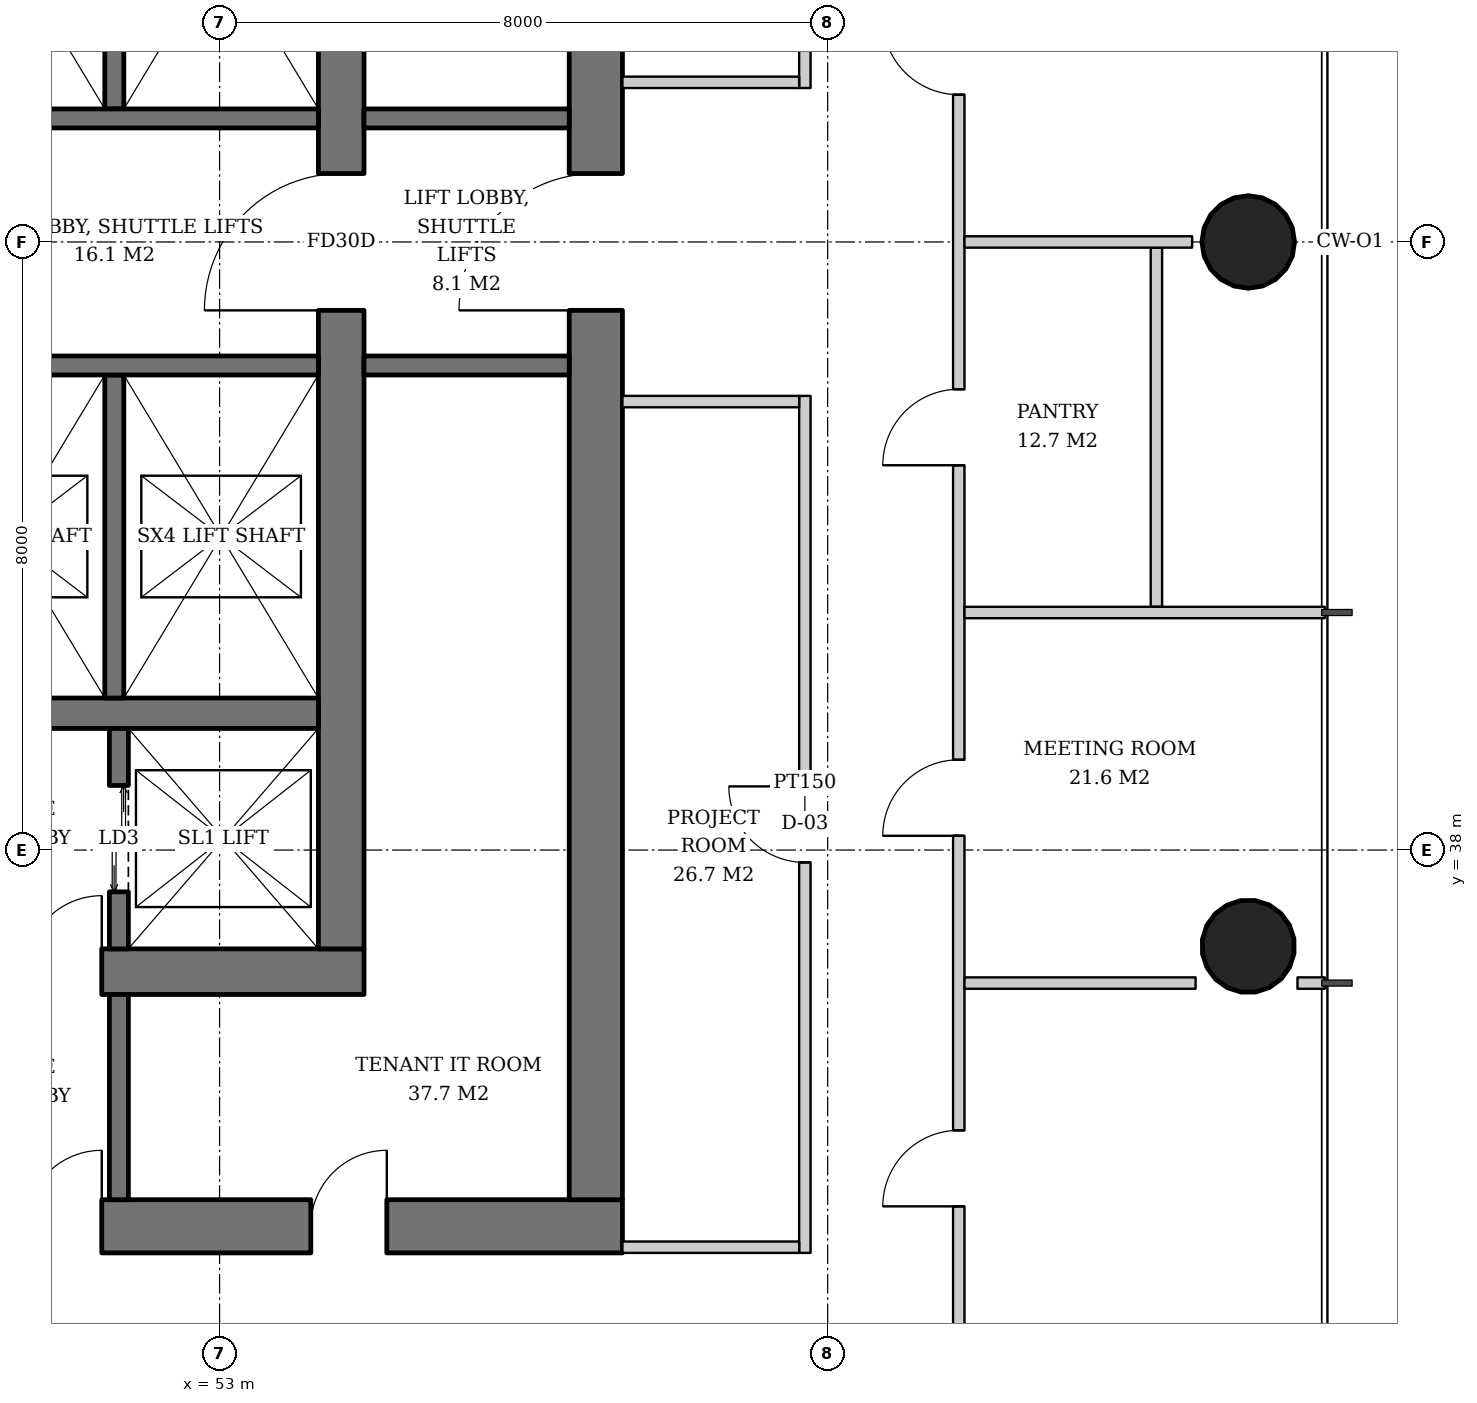
"""IFC4 building model, lengths in metres.
Left out: names, types, materials, properties, quantities, classifications, styles, units other than length and angle.
Written with IfcOpenShell. Run it as: python <this file> out.ifc"""

import sys

from ifc_helpers import new_model, si_unit, direction, frame, frame_2d, origin, origin_2d, place, context, subcontext, project, spatial, rectangle, hollow_circle, extrude, element, fill, save


model = new_model("IFC4")
c1 = context("Model", 3, precision=1e-05, world=origin(), true_north=direction((0.0, 1.0)))
c2 = subcontext(c1, "Body", "Model", "MODEL_VIEW")
j1 = project(units=[si_unit("LENGTHUNIT", "METRE"), si_unit("PLANEANGLEUNIT", "RADIAN")], contexts=[c1])
p1 = place(None, origin())
s1 = spatial("IfcSite", under=j1, at=p1, CompositionType="ELEMENT")
p2 = place(p1, origin())
s2 = spatial("IfcBuilding", under=s1, at=p2, CompositionType="ELEMENT")
p3 = place(p2, frame((0.0, 0.0, 97.0)))
s3 = spatial("IfcBuildingStorey", under=s2, at=p3, CompositionType="ELEMENT", Elevation=97.0)
p4 = place(p3, frame((66.572, 36.714, 0.0), z_axis=(-0.031974442509, 0.015923015547, 0.999361842679), x_axis=(-0.445775033553, -0.895145027055, 0.0)))
e1 = element("IfcColumn", 1, at=p4, inside=s3, PredefinedType="COLUMN", context=c2, shape_type="SweptSolid", body=[
    extrude(hollow_circle(Radius=0.61, WallThickness=0.04, at=origin_2d()), origin(), (0.0, 0.0, 1.0), 3.802),
])
p5 = place(p3, frame((66.572, 46.0, 0.0), z_axis=(-0.031978496719, 0.0, 0.999488557087), x_axis=(0.0, -1.0, 0.0)))
e2 = element("IfcColumn", 2, at=p5, inside=s3, PredefinedType="COLUMN", context=c2, shape_type="SweptSolid", body=[
    extrude(hollow_circle(Radius=0.61, WallThickness=0.04, at=origin_2d()), origin(), (0.0, 0.0, 1.0), 3.802),
])
p6 = place(p3, frame((35.1, 36.4, 0.0), z_axis=(0.0, 0.0, 1.0), x_axis=(1.0, 0.0, 0.0)))
e3 = element("IfcWall", 3, at=p6, inside=s3, PredefinedType="SHEAR", context=c2, shape_type="SweptSolid", body=[
    extrude(rectangle(XDim=19.8, YDim=0.6, at=frame_2d((9.9, 0.0))), origin(), (0.0, 0.0, 1.0), 3.8),
])
p7 = place(p6, frame((3.9, 0.0, 0.0)))
e4 = element("IfcOpeningElement", 4, at=p7, cuts=e3, PredefinedType="OPENING", context=c2, shape_type="SweptSolid", body=[
    extrude(rectangle(XDim=1.0, YDim=2.1, at=frame_2d((0.5, 1.05))), frame((0.0, 0.31, 0.0), z_axis=(0.0, -1.0, 0.0), x_axis=(1.0, 0.0, 0.0)), (0.0, 0.0, 1.0), 0.62),
])
p8 = place(p6, frame((15.35, 0.0, 0.0)))
e5 = element("IfcOpeningElement", 5, at=p8, cuts=e3, PredefinedType="OPENING", context=c2, shape_type="SweptSolid", body=[
    extrude(rectangle(XDim=1.0, YDim=2.1, at=frame_2d((0.5, 1.05))), frame((0.0, 0.31, 0.0), z_axis=(0.0, -1.0, 0.0), x_axis=(1.0, 0.0, 0.0)), (0.0, 0.0, 1.0), 0.62),
])
p9 = place(p3, frame((54.6, 36.7, 0.0), z_axis=(0.0, 0.0, 1.0), x_axis=(0.0, 1.0, 0.0)))
e6 = element("IfcWall", 6, at=p9, inside=s3, PredefinedType="SHEAR", context=c2, shape_type="SweptSolid", body=[
    extrude(rectangle(XDim=18.6, YDim=0.6, at=frame_2d((9.3, 0.0))), origin(), (0.0, 0.0, 1.0), 3.8),
])
p10 = place(p9, frame((8.4, 0.0, 0.0)))
e7 = element("IfcOpeningElement", 7, at=p10, cuts=e6, PredefinedType="OPENING", context=c2, shape_type="SweptSolid", body=[
    extrude(rectangle(XDim=1.8, YDim=2.4, at=frame_2d((0.9, 1.2))), frame((0.0, 0.31, 0.0), z_axis=(0.0, -1.0, 0.0), x_axis=(1.0, 0.0, 0.0)), (0.0, 0.0, 1.0), 0.62),
])
p11 = place(p3, frame((31.7, 33.05, 0.0), z_axis=(0.0, 0.0, 1.0), x_axis=(1.0, 0.0, 0.0)))
e8 = element("IfcWall", 8, at=p11, inside=s3, PredefinedType="SHEAR", context=c2, shape_type="SweptSolid", body=[
    extrude(rectangle(XDim=26.6, YDim=0.7, at=frame_2d((13.3, 0.0))), origin(), (0.0, 0.0, 1.0), 3.8),
])
p12 = place(p11, frame((7.3, 0.0, 0.0)))
e9 = element("IfcOpeningElement", 9, at=p12, cuts=e8, PredefinedType="OPENING", context=c2, shape_type="SweptSolid", body=[
    extrude(rectangle(XDim=1.0, YDim=2.1, at=frame_2d((0.5, 1.05))), frame((0.0, 0.36, 0.0), z_axis=(0.0, -1.0, 0.0), x_axis=(1.0, 0.0, 0.0)), (0.0, 0.0, 1.0), 0.72),
])
p13 = place(p11, frame((18.75, 0.0, 0.0)))
e10 = element("IfcOpeningElement", 10, at=p13, cuts=e8, PredefinedType="OPENING", context=c2, shape_type="SweptSolid", body=[
    extrude(rectangle(XDim=1.0, YDim=2.1, at=frame_2d((0.5, 1.05))), frame((0.0, 0.36, 0.0), z_axis=(0.0, -1.0, 0.0), x_axis=(1.0, 0.0, 0.0)), (0.0, 0.0, 1.0), 0.72),
])
p14 = place(p11, frame((3.2, 0.0, 0.0)))
e11 = element("IfcOpeningElement", 11, at=p14, cuts=e8, PredefinedType="OPENING", context=c2, shape_type="SweptSolid", body=[
    extrude(rectangle(XDim=1.0, YDim=2.1, at=frame_2d((0.5, 1.05))), frame((0.0, 0.36, 0.0), z_axis=(0.0, -1.0, 0.0), x_axis=(1.0, 0.0, 0.0)), (0.0, 0.0, 1.0), 0.72),
])
p15 = place(p11, frame((10.42, 0.0, 0.0)))
e12 = element("IfcOpeningElement", 12, at=p15, cuts=e8, PredefinedType="OPENING", context=c2, shape_type="SweptSolid", body=[
    extrude(rectangle(XDim=1.0, YDim=2.1, at=frame_2d((0.5, 1.05))), frame((0.0, 0.36, 0.0), z_axis=(0.0, -1.0, 0.0), x_axis=(1.0, 0.0, 0.0)), (0.0, 0.0, 1.0), 0.72),
])
p16 = place(p11, frame((14.46, 0.0, 0.0)))
e13 = element("IfcOpeningElement", 13, at=p16, cuts=e8, PredefinedType="OPENING", context=c2, shape_type="SweptSolid", body=[
    extrude(rectangle(XDim=1.0, YDim=2.1, at=frame_2d((0.5, 1.05))), frame((0.0, 0.36, 0.0), z_axis=(0.0, -1.0, 0.0), x_axis=(1.0, 0.0, 0.0)), (0.0, 0.0, 1.0), 0.72),
])
p17 = place(p11, frame((22.5, 0.0, 0.0)))
e14 = element("IfcOpeningElement", 14, at=p17, cuts=e8, PredefinedType="OPENING", context=c2, shape_type="SweptSolid", body=[
    extrude(rectangle(XDim=1.0, YDim=2.1, at=frame_2d((0.5, 1.05))), frame((0.0, 0.36, 0.0), z_axis=(0.0, -1.0, 0.0), x_axis=(1.0, 0.0, 0.0)), (0.0, 0.0, 1.0), 0.72),
])
p18 = place(p3, frame((57.95, 33.4, 0.0), z_axis=(0.0, 0.0, 1.0), x_axis=(0.0, 1.0, 0.0)))
e15 = element("IfcWall", 15, at=p18, inside=s3, PredefinedType="SHEAR", context=c2, shape_type="SweptSolid", body=[
    extrude(rectangle(XDim=25.2, YDim=0.7, at=frame_2d((12.6, 0.0))), origin(), (0.0, 0.0, 1.0), 3.8),
])
p19 = place(p18, frame((11.7, 0.0, 0.0)))
e16 = element("IfcOpeningElement", 16, at=p19, cuts=e15, PredefinedType="OPENING", context=c2, shape_type="SweptSolid", body=[
    extrude(rectangle(XDim=1.8, YDim=2.4, at=frame_2d((0.9, 1.2))), frame((0.0, 0.36, 0.0), z_axis=(0.0, -1.0, 0.0), x_axis=(1.0, 0.0, 0.0)), (0.0, 0.0, 1.0), 0.72),
])
p20 = place(p3, frame((35.7, 39.8, 0.0), z_axis=(0.0, 0.0, 1.0), x_axis=(1.0, 0.0, 0.0)))
e17 = element("IfcWall", 17, at=p20, inside=s3, PredefinedType="SHEAR", context=c2, shape_type="SweptSolid", body=[
    extrude(rectangle(XDim=18.6, YDim=0.4, at=frame_2d((9.3, 0.0))), origin(), (0.0, 0.0, 1.0), 3.8),
])
p21 = place(p3, frame((51.675, 36.7, 0.0), z_axis=(0.0, 0.0, 1.0), x_axis=(0.0, 1.0, 0.0)))
e18 = element("IfcWall", 18, at=p21, inside=s3, PredefinedType="SHEAR", context=c2, shape_type="SweptSolid", body=[
    extrude(rectangle(XDim=2.9, YDim=0.25, at=frame_2d((1.45, 0.0))), origin(), (0.0, 0.0, 1.0), 3.8),
])
p22 = place(p21, frame((0.75, 0.0, 0.0)))
e19 = element("IfcOpeningElement", 19, at=p22, cuts=e18, PredefinedType="OPENING", context=c2, shape_type="SweptSolid", body=[
    extrude(rectangle(XDim=1.4, YDim=2.4, at=frame_2d((0.7, 1.2))), frame((0.0, 0.135, 0.0), z_axis=(0.0, -1.0, 0.0), x_axis=(1.0, 0.0, 0.0)), (0.0, 0.0, 1.0), 0.27),
])
p23 = place(p3, frame((51.615, 47.75, 0.0), z_axis=(0.0, 0.0, 1.0), x_axis=(0.0, 1.0, 0.0)))
e20 = element("IfcWall", 20, at=p23, inside=s3, PredefinedType="SHEAR", context=c2, shape_type="SweptSolid", body=[
    extrude(rectangle(XDim=4.25, YDim=0.25, at=frame_2d((2.125, 0.0))), origin(), (0.0, 0.0, 1.0), 3.8),
])
p24 = place(p3, frame((48.93, 47.625, 0.0), z_axis=(0.0, 0.0, 1.0), x_axis=(1.0, 0.0, 0.0)))
e21 = element("IfcWall", 21, at=p24, inside=s3, PredefinedType="SHEAR", context=c2, shape_type="SweptSolid", body=[
    extrude(rectangle(XDim=5.37, YDim=0.25, at=frame_2d((2.685, 0.0))), origin(), (0.0, 0.0, 1.0), 3.8),
])
p25 = place(p3, frame((51.615, 44.25, 0.0), z_axis=(0.0, 0.0, 1.0), x_axis=(0.0, -1.0, 0.0)))
e22 = element("IfcWall", 22, at=p25, inside=s3, PredefinedType="SHEAR", context=c2, shape_type="SweptSolid", body=[
    extrude(rectangle(XDim=4.25, YDim=0.25, at=frame_2d((2.125, 0.0))), origin(), (0.0, 0.0, 1.0), 3.8),
])
p26 = place(p3, frame((48.93, 44.375, 0.0), z_axis=(0.0, 0.0, 1.0), x_axis=(1.0, 0.0, 0.0)))
e23 = element("IfcWall", 23, at=p26, inside=s3, PredefinedType="SHEAR", context=c2, shape_type="SweptSolid", body=[
    extrude(rectangle(XDim=5.37, YDim=0.25, at=frame_2d((2.685, 0.0))), origin(), (0.0, 0.0, 1.0), 3.8),
])
for number, where, z_axis, x_axis in (
    (24, (54.9, 44.375, 0.0), (0.0, 0.0, 1.0), (1.0, 0.0, 0.0)),
    (25, (54.9, 47.625, 0.0), (0.0, 0.0, 1.0), (1.0, 0.0, 0.0)),
    (26, (51.675, 33.4, 0.0), (0.0, 0.0, 1.0), (0.0, 1.0, 0.0)),
):
    element("IfcWall", number, at=place(p3, frame(where, z_axis=z_axis, x_axis=x_axis)), inside=s3, PredefinedType="SOLIDWALL", context=c2, shape_type="SweptSolid", body=[
        extrude(rectangle(XDim=2.7, YDim=0.25, at=frame_2d((1.35, 0.0))), origin(), (0.0, 0.0, 1.0), 3.62),
    ])
p27 = place(p3, frame((60.7, 32.7, 0.0), z_axis=(0.0, 0.0, 1.0), x_axis=(0.0, 1.0, 0.0)))
e27 = element("IfcWall", 27, at=p27, inside=s3, PredefinedType="PARTITIONING", context=c2, shape_type="SweptSolid", body=[
    extrude(rectangle(XDim=11.275, YDim=0.15, at=frame_2d((5.638, 0.0))), origin(), (0.0, 0.0, 1.0), 2.72),
])
p28 = place(p27, frame((5.137, 0.0, 0.0)))
e28 = element("IfcOpeningElement", 28, at=p28, cuts=e27, PredefinedType="OPENING", context=c2, shape_type="SweptSolid", body=[
    extrude(rectangle(XDim=1.0, YDim=2.1, at=frame_2d((0.5, 1.05))), frame((0.0, 0.085, 0.0), z_axis=(0.0, -1.0, 0.0), x_axis=(1.0, 0.0, 0.0)), (0.0, 0.0, 1.0), 0.17),
])
for number, where, z_axis, x_axis in (
    (29, (58.3, 32.775, 0.0), (0.0, 0.0, 1.0), (1.0, 0.0, 0.0)),
    (30, (58.3, 43.9, 0.0), (0.0, 0.0, 1.0), (1.0, 0.0, 0.0)),
):
    element("IfcWall", number, at=place(p3, frame(where, z_axis=z_axis, x_axis=x_axis)), inside=s3, PredefinedType="PARTITIONING", context=c2, shape_type="SweptSolid", body=[
        extrude(rectangle(XDim=2.325, YDim=0.15, at=frame_2d((1.163, 0.0))), origin(), (0.0, 0.0, 1.0), 3.62),
    ])
p29 = place(p3, frame((60.7, 48.025, 0.0), z_axis=(0.0, 0.0, 1.0), x_axis=(0.0, 1.0, 0.0)))
e31 = element("IfcWall", 31, at=p29, inside=s3, PredefinedType="PARTITIONING", context=c2, shape_type="SweptSolid", body=[
    extrude(rectangle(XDim=11.275, YDim=0.15, at=frame_2d((5.638, 0.0))), origin(), (0.0, 0.0, 1.0), 2.806),
])
p30 = place(p29, frame((5.137, 0.0, 0.0)))
e32 = element("IfcOpeningElement", 32, at=p30, cuts=e31, PredefinedType="OPENING", context=c2, shape_type="SweptSolid", body=[
    extrude(rectangle(XDim=1.0, YDim=2.1, at=frame_2d((0.5, 1.05))), frame((0.0, 0.085, 0.0), z_axis=(0.0, -1.0, 0.0), x_axis=(1.0, 0.0, 0.0)), (0.0, 0.0, 1.0), 0.17),
])
p31 = place(p3, frame((58.3, 48.1, 0.0), z_axis=(0.0, 0.0, 1.0), x_axis=(1.0, 0.0, 0.0)))
e33 = element("IfcWall", 33, at=p31, inside=s3, PredefinedType="PARTITIONING", context=c2, shape_type="SweptSolid", body=[
    extrude(rectangle(XDim=2.325, YDim=0.15, at=frame_2d((1.163, 0.0))), origin(), (0.0, 0.0, 1.0), 3.62),
])
p32 = place(p3, frame((65.325, 41.2, 0.0), z_axis=(0.0, 0.0, 1.0), x_axis=(0.0, 1.0, 0.0)))
e34 = element("IfcWall", 34, at=p32, inside=s3, PredefinedType="PARTITIONING", context=c2, shape_type="SweptSolid", body=[
    extrude(rectangle(XDim=4.725, YDim=0.15, at=frame_2d((2.363, 0.0))), origin(), (0.0, 0.0, 1.0), 2.858),
])
p33 = place(p3, frame((62.725, 30.188, 0.0), z_axis=(0.0, 0.0, 1.0), x_axis=(0.0, 1.0, 0.0)))
e35 = element("IfcWall", 35, at=p33, inside=s3, PredefinedType="PARTITIONING", context=c2, shape_type="SweptSolid", body=[
    extrude(rectangle(XDim=31.623, YDim=0.15, at=frame_2d((15.812, 0.0))), origin(), (0.0, 0.0, 1.0), 2.72),
])
p34 = place(p33, frame((3.124, 0.0, 0.0)))
e36 = element("IfcOpeningElement", 36, at=p34, cuts=e35, PredefinedType="OPENING", context=c2, shape_type="SweptSolid", body=[
    extrude(rectangle(XDim=1.0, YDim=2.1, at=frame_2d((0.5, 1.05))), frame((0.0, 0.085, 0.0), z_axis=(0.0, -1.0, 0.0), x_axis=(1.0, 0.0, 0.0)), (0.0, 0.0, 1.0), 0.17),
])
p35 = place(p33, frame((7.999, 0.0, 0.0)))
e37 = element("IfcOpeningElement", 37, at=p35, cuts=e35, PredefinedType="OPENING", context=c2, shape_type="SweptSolid", body=[
    extrude(rectangle(XDim=1.0, YDim=2.1, at=frame_2d((0.5, 1.05))), frame((0.0, 0.085, 0.0), z_axis=(0.0, -1.0, 0.0), x_axis=(1.0, 0.0, 0.0)), (0.0, 0.0, 1.0), 0.17),
])
p36 = place(p33, frame((12.874, 0.0, 0.0)))
e38 = element("IfcOpeningElement", 38, at=p36, cuts=e35, PredefinedType="OPENING", context=c2, shape_type="SweptSolid", body=[
    extrude(rectangle(XDim=1.0, YDim=2.1, at=frame_2d((0.5, 1.05))), frame((0.0, 0.085, 0.0), z_axis=(0.0, -1.0, 0.0), x_axis=(1.0, 0.0, 0.0)), (0.0, 0.0, 1.0), 0.17),
])
p37 = place(p33, frame((17.749, 0.0, 0.0)))
e39 = element("IfcOpeningElement", 39, at=p37, cuts=e35, PredefinedType="OPENING", context=c2, shape_type="SweptSolid", body=[
    extrude(rectangle(XDim=1.0, YDim=2.1, at=frame_2d((0.5, 1.05))), frame((0.0, 0.085, 0.0), z_axis=(0.0, -1.0, 0.0), x_axis=(1.0, 0.0, 0.0)), (0.0, 0.0, 1.0), 0.17),
])
p38 = place(p33, frame((27.499, 0.0, 0.0)))
e40 = element("IfcOpeningElement", 40, at=p38, cuts=e35, PredefinedType="OPENING", context=c2, shape_type="SweptSolid", body=[
    extrude(rectangle(XDim=1.0, YDim=2.1, at=frame_2d((0.5, 1.05))), frame((0.0, 0.085, 0.0), z_axis=(0.0, -1.0, 0.0), x_axis=(1.0, 0.0, 0.0)), (0.0, 0.0, 1.0), 0.17),
])
p39 = place(p3, frame((62.8, 36.25, 0.0), z_axis=(0.0, 0.0, 1.0), x_axis=(1.0, 0.0, 0.0)))
e41 = element("IfcWall", 41, at=p39, inside=s3, PredefinedType="PARTITIONING", context=c2, shape_type="SweptSolid", body=[
    extrude(rectangle(XDim=3.041, YDim=0.15, at=frame_2d((1.52, 0.0))), origin(), (0.0, 0.0, 1.0), 3.62),
])
p40 = place(p3, frame((67.181, 36.25, 0.0), z_axis=(0.0, 0.0, 1.0), x_axis=(1.0, 0.0, 0.0)))
e42 = element("IfcWall", 42, at=p40, inside=s3, PredefinedType="PARTITIONING", context=c2, shape_type="SweptSolid", body=[
    extrude(rectangle(XDim=0.359, YDim=0.15, at=frame_2d((0.18, 0.0))), origin(), (0.0, 0.0, 1.0), 3.62),
])
p41 = place(p3, frame((62.8, 41.125, 0.0), z_axis=(0.0, 0.0, 1.0), x_axis=(1.0, 0.0, 0.0)))
e43 = element("IfcWall", 43, at=p41, inside=s3, PredefinedType="PARTITIONING", context=c2, shape_type="SweptSolid", body=[
    extrude(rectangle(XDim=4.74, YDim=0.15, at=frame_2d((2.37, 0.0))), origin(), (0.0, 0.0, 1.0), 2.82),
])
p42 = place(p3, frame((62.8, 46.0, 0.0), z_axis=(0.0, 0.0, 1.0), x_axis=(1.0, 0.0, 0.0)))
e44 = element("IfcWall", 44, at=p42, inside=s3, PredefinedType="PARTITIONING", context=c2, shape_type="SweptSolid", body=[
    extrude(rectangle(XDim=2.995, YDim=0.15, at=frame_2d((1.498, 0.0))), origin(), (0.0, 0.0, 1.0), 2.858),
])
p43 = place(p22, origin())
e45 = element("IfcDoor", 45, at=p43, inside=s3, OperationType="DOUBLE_DOOR_SLIDING", PredefinedType="DOOR", context=c2, shape_type="SweptSolid", body=[
    extrude(rectangle(XDim=1.4, YDim=2.4, at=frame_2d((0.7, 1.2))), frame((0.0, 0.025, 0.0), z_axis=(0.0, -1.0, 0.0), x_axis=(1.0, 0.0, 0.0)), (0.0, 0.0, 1.0), 0.05),
])
fill(e19, e45)
p44 = place(p10, origin())
e46 = element("IfcDoor", 46, at=p44, inside=s3, OperationType="DOUBLE_DOOR_SINGLE_SWING", PredefinedType="DOOR", context=c2, shape_type="SweptSolid", body=[
    extrude(rectangle(XDim=1.8, YDim=2.4, at=frame_2d((0.9, 1.2))), frame((0.0, 0.025, 0.0), z_axis=(0.0, -1.0, 0.0), x_axis=(1.0, 0.0, 0.0)), (0.0, 0.0, 1.0), 0.05),
])
fill(e7, e46)
p45 = place(p8, origin())
e47 = element("IfcDoor", 47, at=p45, inside=s3, OperationType="SINGLE_SWING_RIGHT", PredefinedType="DOOR", context=c2, shape_type="SweptSolid", body=[
    extrude(rectangle(XDim=1.0, YDim=2.1, at=frame_2d((0.5, 1.05))), frame((0.0, 0.025, 0.0), z_axis=(0.0, -1.0, 0.0), x_axis=(1.0, 0.0, 0.0)), (0.0, 0.0, 1.0), 0.05),
])
fill(e5, e47)
p46 = place(p19, origin())
e48 = element("IfcDoor", 48, at=p46, inside=s3, OperationType="DOUBLE_DOOR_SINGLE_SWING", PredefinedType="DOOR", context=c2, shape_type="SweptSolid", body=[
    extrude(rectangle(XDim=1.8, YDim=2.4, at=frame_2d((0.9, 1.2))), frame((0.0, 0.025, 0.0), z_axis=(0.0, -1.0, 0.0), x_axis=(1.0, 0.0, 0.0)), (0.0, 0.0, 1.0), 0.05),
])
fill(e16, e48)
p47 = place(p13, origin())
e49 = element("IfcDoor", 49, at=p47, inside=s3, OperationType="SINGLE_SWING_RIGHT", PredefinedType="DOOR", context=c2, shape_type="SweptSolid", body=[
    extrude(rectangle(XDim=1.0, YDim=2.1, at=frame_2d((0.5, 1.05))), frame((0.0, 0.025, 0.0), z_axis=(0.0, -1.0, 0.0), x_axis=(1.0, 0.0, 0.0)), (0.0, 0.0, 1.0), 0.05),
])
fill(e10, e49)
p48 = place(p17, origin())
e50 = element("IfcDoor", 50, at=p48, inside=s3, OperationType="SINGLE_SWING_RIGHT", PredefinedType="DOOR", context=c2, shape_type="SweptSolid", body=[
    extrude(rectangle(XDim=1.0, YDim=2.1, at=frame_2d((0.5, 1.05))), frame((0.0, 0.34, 0.0), z_axis=(0.0, -1.0, 0.0), x_axis=(1.0, 0.0, 0.0)), (0.0, 0.0, 1.0), 0.05),
])
fill(e14, e50)
p49 = place(p28, origin())
e51 = element("IfcDoor", 51, at=p49, inside=s3, OperationType="SINGLE_SWING_RIGHT", PredefinedType="DOOR", context=c2, shape_type="SweptSolid", body=[
    extrude(rectangle(XDim=1.0, YDim=2.1, at=frame_2d((0.5, 1.05))), frame((0.0, 0.025, 0.0), z_axis=(0.0, -1.0, 0.0), x_axis=(1.0, 0.0, 0.0)), (0.0, 0.0, 1.0), 0.05),
])
fill(e28, e51)
p50 = place(p34, origin())
e52 = element("IfcDoor", 52, at=p50, inside=s3, OperationType="SINGLE_SWING_LEFT", PredefinedType="DOOR", context=c2, shape_type="SweptSolid", body=[
    extrude(rectangle(XDim=1.0, YDim=2.1, at=frame_2d((0.5, 1.05))), frame((0.0, 0.025, 0.0), z_axis=(0.0, -1.0, 0.0), x_axis=(1.0, 0.0, 0.0)), (0.0, 0.0, 1.0), 0.05),
])
fill(e36, e52)
p51 = place(p35, origin())
e53 = element("IfcDoor", 53, at=p51, inside=s3, OperationType="SINGLE_SWING_LEFT", PredefinedType="DOOR", context=c2, shape_type="SweptSolid", body=[
    extrude(rectangle(XDim=1.0, YDim=2.1, at=frame_2d((0.5, 1.05))), frame((0.0, 0.025, 0.0), z_axis=(0.0, -1.0, 0.0), x_axis=(1.0, 0.0, 0.0)), (0.0, 0.0, 1.0), 0.05),
])
fill(e37, e53)
p52 = place(p36, origin())
e54 = element("IfcDoor", 54, at=p52, inside=s3, OperationType="SINGLE_SWING_LEFT", PredefinedType="DOOR", context=c2, shape_type="SweptSolid", body=[
    extrude(rectangle(XDim=1.0, YDim=2.1, at=frame_2d((0.5, 1.05))), frame((0.0, 0.025, 0.0), z_axis=(0.0, -1.0, 0.0), x_axis=(1.0, 0.0, 0.0)), (0.0, 0.0, 1.0), 0.05),
])
fill(e38, e54)
p53 = place(p37, origin())
e55 = element("IfcDoor", 55, at=p53, inside=s3, OperationType="SINGLE_SWING_RIGHT", PredefinedType="DOOR", context=c2, shape_type="SweptSolid", body=[
    extrude(rectangle(XDim=1.0, YDim=2.1, at=frame_2d((0.5, 1.05))), frame((0.0, 0.025, 0.0), z_axis=(0.0, -1.0, 0.0), x_axis=(1.0, 0.0, 0.0)), (0.0, 0.0, 1.0), 0.05),
])
fill(e39, e55)
save(model, sys.argv[1])
